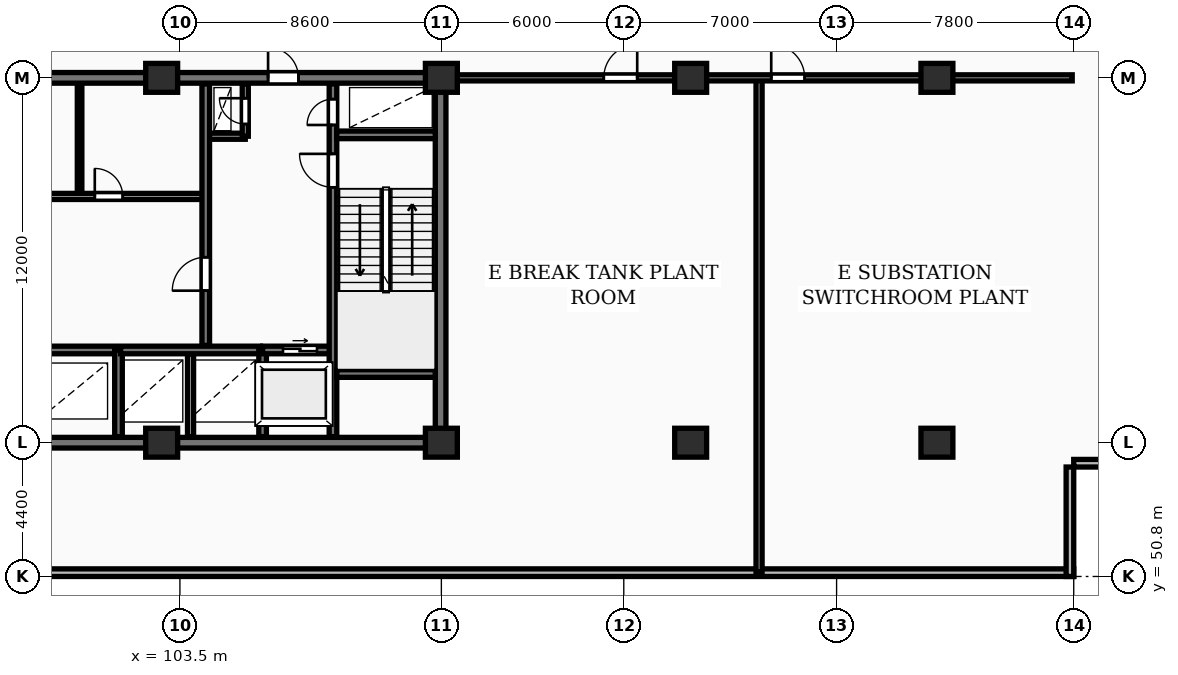
"""IFC4 building model, lengths in metres.
Left out: names, types, materials, properties, quantities, classifications, styles, units other than length and angle.
Written with IfcOpenShell. Run it as: python <this file> out.ifc"""

import sys

from ifc_helpers import new_model, si_unit, direction, frame, frame_2d, origin, origin_2d, place, context, subcontext, project, spatial, rectangle, extrude, element, fill, save


model = new_model("IFC4")
c1 = context("Model", 3, precision=1e-05, world=origin(), true_north=direction((0.0, 1.0)))
c2 = subcontext(c1, "Body", "Model", "MODEL_VIEW")
j1 = project(units=[si_unit("LENGTHUNIT", "METRE"), si_unit("PLANEANGLEUNIT", "RADIAN")], contexts=[c1])
p1 = place(None, origin())
s1 = spatial("IfcSite", under=j1, at=p1, CompositionType="ELEMENT")
p2 = place(p1, origin())
s2 = spatial("IfcBuilding", under=s1, at=p2, CompositionType="ELEMENT")
p3 = place(p2, frame((0.0, 0.0, 76.0)))
s3 = spatial("IfcBuildingStorey", under=s2, at=p3, CompositionType="ELEMENT", Elevation=76.0)
for number, where, z_axis, x_axis in (
    (1, (102.9, 55.2, 0.0), (0.0, 0.0, 1.0), (1.0, 0.0, 0.0)),
    (2, (102.9, 67.2, 0.0), (0.0, 0.0, 1.0), (1.0, 0.0, 0.0)),
    (3, (112.1, 55.2, 0.0), (0.0, 0.0, 1.0), (1.0, 0.0, 0.0)),
    (4, (112.1, 67.2, 0.0), (0.0, 0.0, 1.0), (1.0, 0.0, 0.0)),
    (5, (120.3, 55.2, 0.0), (0.0, 0.0, 1.0), (1.0, 0.0, 0.0)),
    (6, (120.3, 67.2, 0.0), (0.0, 0.0, 1.0), (1.0, 0.0, 0.0)),
    (7, (128.4, 55.2, 0.0), (0.0, 0.0, 1.0), (1.0, 0.0, 0.0)),
    (8, (128.4, 67.2, 0.0), (0.0, 0.0, 1.0), (1.0, 0.0, 0.0)),
):
    element("IfcColumn", number, at=place(p3, frame(where, z_axis=z_axis, x_axis=x_axis)), inside=s3, PredefinedType="COLUMN", context=c2, shape_type="SweptSolid", body=[
        extrude(rectangle(XDim=1.05, YDim=0.95, at=origin_2d()), origin(), (0.0, 0.0, 1.0), 4.8),
    ])
p4 = place(p3, frame((55.3, 50.925, 0.0), z_axis=(0.0, 0.0, 1.0), x_axis=(1.0, 0.0, 0.0)))
e9 = element("IfcWall", 9, at=p4, inside=s3, PredefinedType="SHEAR", context=c2, shape_type="SweptSolid", body=[
    extrude(rectangle(XDim=77.6, YDim=0.25, at=frame_2d((38.8, 0.0))), origin(), (0.0, 0.0, 1.0), 4.48),
])
p5 = place(p3, frame((132.775, 50.8, 0.0), z_axis=(0.0, 0.0, 1.0), x_axis=(0.0, 1.0, 0.0)))
e10 = element("IfcWall", 10, at=p5, inside=s3, PredefinedType="SHEAR", context=c2, shape_type="SweptSolid", body=[
    extrude(rectangle(XDim=3.6, YDim=0.25, at=frame_2d((1.8, 0.0))), origin(), (0.0, 0.0, 1.0), 4.48),
])
p6 = place(p3, frame((132.9, 54.525, 0.0), z_axis=(0.0, 0.0, 1.0), x_axis=(1.0, 0.0, 0.0)))
e11 = element("IfcWall", 11, at=p6, inside=s3, PredefinedType="SHEAR", context=c2, shape_type="SweptSolid", body=[
    extrude(rectangle(XDim=3.6, YDim=0.25, at=frame_2d((1.8, 0.0))), origin(), (0.0, 0.0, 1.0), 4.48),
])
p7 = place(p3, frame((75.95, 55.2, 0.0), z_axis=(0.0, 0.0, 1.0), x_axis=(1.0, 0.0, 0.0)))
e12 = element("IfcWall", 12, at=p7, inside=s3, PredefinedType="SHEAR", context=c2, shape_type="SweptSolid", body=[
    extrude(rectangle(XDim=36.3, YDim=0.35, at=frame_2d((18.15, 0.0))), origin(), (0.0, 0.0, 1.0), 4.8),
])
p8 = place(p3, frame((112.075, 55.375, 0.0), z_axis=(0.0, 0.0, 1.0), x_axis=(0.0, 1.0, 0.0)))
e13 = element("IfcWall", 13, at=p8, inside=s3, PredefinedType="SHEAR", context=c2, shape_type="SweptSolid", body=[
    extrude(rectangle(XDim=11.65, YDim=0.35, at=frame_2d((5.825, 0.0))), origin(), (0.0, 0.0, 1.0), 4.8),
])
p9 = place(p3, frame((75.95, 67.2, 0.0), z_axis=(0.0, 0.0, 1.0), x_axis=(1.0, 0.0, 0.0)))
e14 = element("IfcWall", 14, at=p9, inside=s3, PredefinedType="SHEAR", context=c2, shape_type="SweptSolid", body=[
    extrude(rectangle(XDim=36.3, YDim=0.35, at=frame_2d((18.15, 0.0))), origin(), (0.0, 0.0, 1.0), 4.8),
])
p10 = place(p9, frame((5.25, 0.0, 0.0)))
e15 = element("IfcOpeningElement", 15, at=p10, cuts=e14, PredefinedType="OPENING", context=c2, shape_type="SweptSolid", body=[
    extrude(rectangle(XDim=1.0, YDim=2.15, at=frame_2d((0.5, 1.075))), frame((0.0, 0.185, 0.0), z_axis=(0.0, -1.0, 0.0), x_axis=(1.0, 0.0, 0.0)), (0.0, 0.0, 1.0), 0.37),
])
p11 = place(p9, frame((21.6, 0.0, 0.0)))
e16 = element("IfcOpeningElement", 16, at=p11, cuts=e14, PredefinedType="OPENING", context=c2, shape_type="SweptSolid", body=[
    extrude(rectangle(XDim=1.5, YDim=2.2, at=frame_2d((0.75, 1.1))), frame((0.0, 0.185, 0.0), z_axis=(0.0, -1.0, 0.0), x_axis=(1.0, 0.0, 0.0)), (0.0, 0.0, 1.0), 0.37),
])
p12 = place(p9, frame((30.45, 0.0, 0.0)))
e17 = element("IfcOpeningElement", 17, at=p12, cuts=e14, PredefinedType="OPENING", context=c2, shape_type="SweptSolid", body=[
    extrude(rectangle(XDim=1.0, YDim=2.15, at=frame_2d((0.5, 1.075))), frame((0.0, 0.185, 0.0), z_axis=(0.0, -1.0, 0.0), x_axis=(1.0, 0.0, 0.0)), (0.0, 0.0, 1.0), 0.37),
])
p13 = place(p3, frame((93.02, 58.25, 0.0), z_axis=(0.0, 0.0, 1.0), x_axis=(1.0, 0.0, 0.0)))
e18 = element("IfcWall", 18, at=p13, inside=s3, PredefinedType="SHEAR", context=c2, shape_type="SweptSolid", body=[
    extrude(rectangle(XDim=8.36, YDim=0.25, at=frame_2d((4.18, 0.0))), origin(), (0.0, 0.0, 1.0), 4.8),
])
p14 = place(p3, frame((101.48, 55.4, 0.0), z_axis=(0.0, 0.0, 1.0), x_axis=(0.0, 1.0, 0.0)))
e19 = element("IfcWall", 19, at=p14, inside=s3, PredefinedType="SHEAR", context=c2, shape_type="SweptSolid", body=[
    extrude(rectangle(XDim=2.85, YDim=0.25, at=frame_2d((1.425, 0.0))), origin(), (0.0, 0.0, 1.0), 4.8),
])
p15 = place(p3, frame((103.85, 55.4, 0.0), z_axis=(0.0, 0.0, 1.0), x_axis=(0.0, 1.0, 0.0)))
e20 = element("IfcWall", 20, at=p15, inside=s3, PredefinedType="PARTITIONING", context=c2, shape_type="SweptSolid", body=[
    extrude(rectangle(XDim=2.72, YDim=0.2, at=frame_2d((1.36, 0.0))), origin(), (0.0, 0.0, 1.0), 4.48),
])
p16 = place(p3, frame((101.55, 58.25, 0.0), z_axis=(0.0, 0.0, 1.0), x_axis=(1.0, 0.0, 0.0)))
e21 = element("IfcWall", 21, at=p16, inside=s3, PredefinedType="SHEAR", context=c2, shape_type="SweptSolid", body=[
    extrude(rectangle(XDim=4.6, YDim=0.25, at=frame_2d((2.3, 0.0))), origin(), (0.0, 0.0, 1.0), 4.8),
])
p17 = place(p3, frame((106.22, 55.4, 0.0), z_axis=(0.0, 0.0, 1.0), x_axis=(0.0, 1.0, 0.0)))
e22 = element("IfcWall", 22, at=p17, inside=s3, PredefinedType="SHEAR", context=c2, shape_type="SweptSolid", body=[
    extrude(rectangle(XDim=2.85, YDim=0.25, at=frame_2d((1.425, 0.0))), origin(), (0.0, 0.0, 1.0), 4.8),
])
p18 = place(p3, frame((106.22, 58.25, 0.0), z_axis=(0.0, 0.0, 1.0), x_axis=(1.0, 0.0, 0.0)))
e23 = element("IfcWall", 23, at=p18, inside=s3, PredefinedType="SHEAR", context=c2, shape_type="SweptSolid", body=[
    extrude(rectangle(XDim=2.46, YDim=0.25, at=frame_2d((1.23, 0.0))), origin(), (0.0, 0.0, 1.0), 4.8),
])
p19 = place(p18, frame((0.67, 0.0, 0.0)))
e24 = element("IfcOpeningElement", 24, at=p19, cuts=e23, PredefinedType="OPENING", context=c2, shape_type="SweptSolid", body=[
    extrude(rectangle(XDim=1.12, YDim=2.12, at=frame_2d((0.56, 1.06))), frame((0.0, 0.135, 0.0), z_axis=(0.0, -1.0, 0.0), x_axis=(1.0, 0.0, 0.0)), (0.0, 0.0, 1.0), 0.27),
])
p20 = place(p3, frame((100.2, 63.4, 0.0), z_axis=(0.0, 0.0, 1.0), x_axis=(0.0, 1.0, 0.0)))
e25 = element("IfcWall", 25, at=p20, inside=s3, PredefinedType="PARTITIONING", context=c2, shape_type="SweptSolid", body=[
    extrude(rectangle(XDim=3.6, YDim=0.15, at=frame_2d((1.8, 0.0))), origin(), (0.0, 0.0, 1.0), 4.48),
])
p21 = place(p3, frame((84.42, 63.3, 0.0), z_axis=(0.0, 0.0, 1.0), x_axis=(1.0, 0.0, 0.0)))
e26 = element("IfcWall", 26, at=p21, inside=s3, PredefinedType="PARTITIONING", context=c2, shape_type="SweptSolid", body=[
    extrude(rectangle(XDim=19.83, YDim=0.2, at=frame_2d((9.915, 0.0))), origin(), (0.0, 0.0, 1.0), 4.48),
])
p22 = place(p21, frame((1.15, 0.0, 0.0)))
e27 = element("IfcOpeningElement", 27, at=p22, cuts=e26, PredefinedType="OPENING", context=c2, shape_type="SweptSolid", body=[
    extrude(rectangle(XDim=0.85, YDim=2.05, at=frame_2d((0.425, 1.025))), frame((0.0, 0.11, 0.0), z_axis=(0.0, -1.0, 0.0), x_axis=(1.0, 0.0, 0.0)), (0.0, 0.0, 1.0), 0.22),
])
p23 = place(p21, frame((3.25, 0.0, 0.0)))
e28 = element("IfcOpeningElement", 28, at=p23, cuts=e26, PredefinedType="OPENING", context=c2, shape_type="SweptSolid", body=[
    extrude(rectangle(XDim=0.85, YDim=2.05, at=frame_2d((0.425, 1.025))), frame((0.0, 0.11, 0.0), z_axis=(0.0, -1.0, 0.0), x_axis=(1.0, 0.0, 0.0)), (0.0, 0.0, 1.0), 0.22),
])
p24 = place(p21, frame((13.08, 0.0, 0.0)))
e29 = element("IfcOpeningElement", 29, at=p24, cuts=e26, PredefinedType="OPENING", context=c2, shape_type="SweptSolid", body=[
    extrude(rectangle(XDim=1.5, YDim=2.2, at=frame_2d((0.75, 1.1))), frame((0.0, 0.11, 0.0), z_axis=(0.0, -1.0, 0.0), x_axis=(1.0, 0.0, 0.0)), (0.0, 0.0, 1.0), 0.22),
])
p25 = place(p21, frame((6.78, 0.0, 0.0)))
e30 = element("IfcOpeningElement", 30, at=p25, cuts=e26, PredefinedType="OPENING", context=c2, shape_type="SweptSolid", body=[
    extrude(rectangle(XDim=0.92, YDim=2.08, at=frame_2d((0.46, 1.04))), frame((0.0, 0.11, 0.0), z_axis=(0.0, -1.0, 0.0), x_axis=(1.0, 0.0, 0.0)), (0.0, 0.0, 1.0), 0.22),
])
p26 = place(p21, frame((16.28, 0.0, 0.0)))
e31 = element("IfcOpeningElement", 31, at=p26, cuts=e26, PredefinedType="OPENING", context=c2, shape_type="SweptSolid", body=[
    extrude(rectangle(XDim=0.92, YDim=2.08, at=frame_2d((0.46, 1.04))), frame((0.0, 0.11, 0.0), z_axis=(0.0, -1.0, 0.0), x_axis=(1.0, 0.0, 0.0)), (0.0, 0.0, 1.0), 0.22),
])
p27 = place(p3, frame((104.45, 65.28, 0.0), z_axis=(0.0, 0.0, 1.0), x_axis=(1.0, 0.0, 0.0)))
e32 = element("IfcWall", 32, at=p27, inside=s3, PredefinedType="PARTITIONING", context=c2, shape_type="SweptSolid", body=[
    extrude(rectangle(XDim=1.2, YDim=0.2, at=frame_2d((0.6, 0.0))), origin(), (0.0, 0.0, 1.0), 4.48),
])
p28 = place(p3, frame((105.65, 65.28, 0.0), z_axis=(0.0, 0.0, 1.0), x_axis=(0.0, 1.0, 0.0)))
e33 = element("IfcWall", 33, at=p28, inside=s3, PredefinedType="PARTITIONING", context=c2, shape_type="SweptSolid", body=[
    extrude(rectangle(XDim=1.72, YDim=0.2, at=frame_2d((0.86, 0.0))), origin(), (0.0, 0.0, 1.0), 4.48),
])
p29 = place(p28, frame((0.4, 0.0, 0.0)))
e34 = element("IfcOpeningElement", 34, at=p29, cuts=e33, PredefinedType="OPENING", context=c2, shape_type="SweptSolid", body=[
    extrude(rectangle(XDim=0.85, YDim=2.05, at=frame_2d((0.425, 1.025))), frame((0.0, 0.11, 0.0), z_axis=(0.0, -1.0, 0.0), x_axis=(1.0, 0.0, 0.0)), (0.0, 0.0, 1.0), 0.22),
])
p30 = place(p3, frame((104.35, 58.4, 0.0), z_axis=(0.0, 0.0, 1.0), x_axis=(0.0, 1.0, 0.0)))
e35 = element("IfcWall", 35, at=p30, inside=s3, PredefinedType="SHEAR", context=c2, shape_type="SweptSolid", body=[
    extrude(rectangle(XDim=8.6, YDim=0.25, at=frame_2d((4.3, 0.0))), origin(), (0.0, 0.0, 1.0), 4.8),
])
p31 = place(p30, frame((1.8, 0.0, 0.0)))
e36 = element("IfcOpeningElement", 36, at=p31, cuts=e35, PredefinedType="OPENING", context=c2, shape_type="SweptSolid", body=[
    extrude(rectangle(XDim=1.1, YDim=2.1, at=frame_2d((0.55, 1.05))), frame((0.0, 0.135, 0.0), z_axis=(0.0, -1.0, 0.0), x_axis=(1.0, 0.0, 0.0)), (0.0, 0.0, 1.0), 0.27),
])
p32 = place(p3, frame((108.535, 55.4, 0.0), z_axis=(0.0, 0.0, 1.0), x_axis=(0.0, 1.0, 0.0)))
e37 = element("IfcWall", 37, at=p32, inside=s3, PredefinedType="SHEAR", context=c2, shape_type="SweptSolid", body=[
    extrude(rectangle(XDim=11.6, YDim=0.25, at=frame_2d((5.8, 0.0))), origin(), (0.0, 0.0, 1.0), 4.8),
])
p33 = place(p32, frame((8.2, 0.0, 0.0)))
e38 = element("IfcOpeningElement", 38, at=p33, cuts=e37, PredefinedType="OPENING", context=c2, shape_type="SweptSolid", body=[
    extrude(rectangle(XDim=1.1, YDim=2.1, at=frame_2d((0.55, 1.05))), frame((0.0, 0.135, 0.0), z_axis=(0.0, -1.0, 0.0), x_axis=(1.0, 0.0, 0.0)), (0.0, 0.0, 1.0), 0.27),
])
p34 = place(p32, frame((10.25, 0.0, 0.0)))
e39 = element("IfcOpeningElement", 39, at=p34, cuts=e37, PredefinedType="OPENING", context=c2, shape_type="SweptSolid", body=[
    extrude(rectangle(XDim=0.85, YDim=2.05, at=frame_2d((0.425, 1.025))), frame((0.0, 0.135, 0.0), z_axis=(0.0, -1.0, 0.0), x_axis=(1.0, 0.0, 0.0)), (0.0, 0.0, 1.0), 0.27),
])
for number, where, z_axis, x_axis in (
    (40, (108.66, 57.475, 0.0), (0.0, 0.0, 1.0), (1.0, 0.0, 0.0)),
    (41, (108.66, 65.325, 0.0), (0.0, 0.0, 1.0), (1.0, 0.0, 0.0)),
):
    element("IfcWall", number, at=place(p3, frame(where, z_axis=z_axis, x_axis=x_axis)), inside=s3, PredefinedType="SHEAR", context=c2, shape_type="SweptSolid", body=[
        extrude(rectangle(XDim=3.24, YDim=0.25, at=frame_2d((1.62, 0.0))), origin(), (0.0, 0.0, 1.0), 4.8),
    ])
p35 = place(p3, frame((122.55, 50.95, 0.0), z_axis=(0.0, 0.0, 1.0), x_axis=(0.0, 1.0, 0.0)))
e42 = element("IfcWall", 42, at=p35, inside=s3, PredefinedType="PARTITIONING", context=c2, shape_type="SweptSolid", body=[
    extrude(rectangle(XDim=16.2, YDim=0.2, at=frame_2d((8.1, 0.0))), origin(), (0.0, 0.0, 1.0), 4.48),
])
p36 = place(p3, frame((112.25, 67.2, 0.0), z_axis=(0.0, 0.0, 1.0), x_axis=(1.0, 0.0, 0.0)))
e43 = element("IfcWall", 43, at=p36, inside=s3, PredefinedType="PARTITIONING", context=c2, shape_type="SweptSolid", body=[
    extrude(rectangle(XDim=20.6, YDim=0.2, at=frame_2d((10.3, 0.0))), origin(), (0.0, 0.0, 1.0), 3.23),
])
p37 = place(p36, frame((5.192, 0.0, 0.0)))
e44 = element("IfcOpeningElement", 44, at=p37, cuts=e43, PredefinedType="OPENING", context=c2, shape_type="SweptSolid", body=[
    extrude(rectangle(XDim=1.1, YDim=2.1, at=frame_2d((0.55, 1.05))), frame((0.0, 0.11, 0.0), z_axis=(0.0, -1.0, 0.0), x_axis=(1.0, 0.0, 0.0)), (0.0, 0.0, 1.0), 0.22),
])
p38 = place(p36, frame((10.7, 0.0, 0.0)))
e45 = element("IfcOpeningElement", 45, at=p38, cuts=e43, PredefinedType="OPENING", context=c2, shape_type="SweptSolid", body=[
    extrude(rectangle(XDim=1.1, YDim=2.1, at=frame_2d((0.55, 1.05))), frame((0.0, 0.11, 0.0), z_axis=(0.0, -1.0, 0.0), x_axis=(1.0, 0.0, 0.0)), (0.0, 0.0, 1.0), 0.22),
])
p39 = place(p12, origin())
e46 = element("IfcDoor", 46, at=p39, inside=s3, OperationType="SINGLE_SWING_LEFT", PredefinedType="DOOR", context=c2, shape_type="SweptSolid", body=[
    extrude(rectangle(XDim=1.0, YDim=2.15, at=frame_2d((0.5, 1.075))), frame((0.0, 0.025, 0.0), z_axis=(0.0, -1.0, 0.0), x_axis=(1.0, 0.0, 0.0)), (0.0, 0.0, 1.0), 0.05),
])
fill(e17, e46)
p40 = place(p19, origin())
e47 = element("IfcDoor", 47, at=p40, inside=s3, OperationType="SLIDING_TO_RIGHT", PredefinedType="DOOR", context=c2, shape_type="SweptSolid", body=[
    extrude(rectangle(XDim=1.12, YDim=2.12, at=frame_2d((0.56, 1.06))), frame((0.0, 0.025, 0.0), z_axis=(0.0, -1.0, 0.0), x_axis=(1.0, 0.0, 0.0)), (0.0, 0.0, 1.0), 0.05),
])
fill(e24, e47)
p41 = place(p26, origin())
e48 = element("IfcDoor", 48, at=p41, inside=s3, OperationType="SINGLE_SWING_LEFT", PredefinedType="DOOR", context=c2, shape_type="SweptSolid", body=[
    extrude(rectangle(XDim=0.92, YDim=2.08, at=frame_2d((0.46, 1.04))), frame((0.0, 0.025, 0.0), z_axis=(0.0, -1.0, 0.0), x_axis=(1.0, 0.0, 0.0)), (0.0, 0.0, 1.0), 0.05),
])
fill(e31, e48)
p42 = place(p29, origin())
e49 = element("IfcDoor", 49, at=p42, inside=s3, OperationType="SINGLE_SWING_RIGHT", PredefinedType="DOOR", context=c2, shape_type="SweptSolid", body=[
    extrude(rectangle(XDim=0.85, YDim=2.05, at=frame_2d((0.425, 1.025))), frame((0.0, 0.025, 0.0), z_axis=(0.0, -1.0, 0.0), x_axis=(1.0, 0.0, 0.0)), (0.0, 0.0, 1.0), 0.05),
])
fill(e34, e49)
p43 = place(p31, origin())
e50 = element("IfcDoor", 50, at=p43, inside=s3, OperationType="SINGLE_SWING_LEFT", PredefinedType="DOOR", context=c2, shape_type="SweptSolid", body=[
    extrude(rectangle(XDim=1.1, YDim=2.1, at=frame_2d((0.55, 1.05))), frame((0.0, 0.025, 0.0), z_axis=(0.0, -1.0, 0.0), x_axis=(1.0, 0.0, 0.0)), (0.0, 0.0, 1.0), 0.05),
])
fill(e36, e50)
p44 = place(p33, origin())
e51 = element("IfcDoor", 51, at=p44, inside=s3, OperationType="SINGLE_SWING_RIGHT", PredefinedType="DOOR", context=c2, shape_type="SweptSolid", body=[
    extrude(rectangle(XDim=1.1, YDim=2.1, at=frame_2d((0.55, 1.05))), frame((0.0, 0.025, 0.0), z_axis=(0.0, -1.0, 0.0), x_axis=(1.0, 0.0, 0.0)), (0.0, 0.0, 1.0), 0.05),
])
fill(e38, e51)
p45 = place(p34, origin())
e52 = element("IfcDoor", 52, at=p45, inside=s3, OperationType="SINGLE_SWING_LEFT", PredefinedType="DOOR", context=c2, shape_type="SweptSolid", body=[
    extrude(rectangle(XDim=0.85, YDim=2.05, at=frame_2d((0.425, 1.025))), frame((0.0, 0.025, 0.0), z_axis=(0.0, -1.0, 0.0), x_axis=(1.0, 0.0, 0.0)), (0.0, 0.0, 1.0), 0.05),
])
fill(e39, e52)
p46 = place(p37, origin())
e53 = element("IfcDoor", 53, at=p46, inside=s3, OperationType="SINGLE_SWING_RIGHT", PredefinedType="DOOR", context=c2, shape_type="SweptSolid", body=[
    extrude(rectangle(XDim=1.1, YDim=2.1, at=frame_2d((0.55, 1.05))), frame((0.0, 0.025, 0.0), z_axis=(0.0, -1.0, 0.0), x_axis=(1.0, 0.0, 0.0)), (0.0, 0.0, 1.0), 0.05),
])
fill(e44, e53)
p47 = place(p38, origin())
e54 = element("IfcDoor", 54, at=p47, inside=s3, OperationType="SINGLE_SWING_LEFT", PredefinedType="DOOR", context=c2, shape_type="SweptSolid", body=[
    extrude(rectangle(XDim=1.1, YDim=2.1, at=frame_2d((0.55, 1.05))), frame((0.0, 0.025, 0.0), z_axis=(0.0, -1.0, 0.0), x_axis=(1.0, 0.0, 0.0)), (0.0, 0.0, 1.0), 0.05),
])
fill(e45, e54)
save(model, sys.argv[1])
